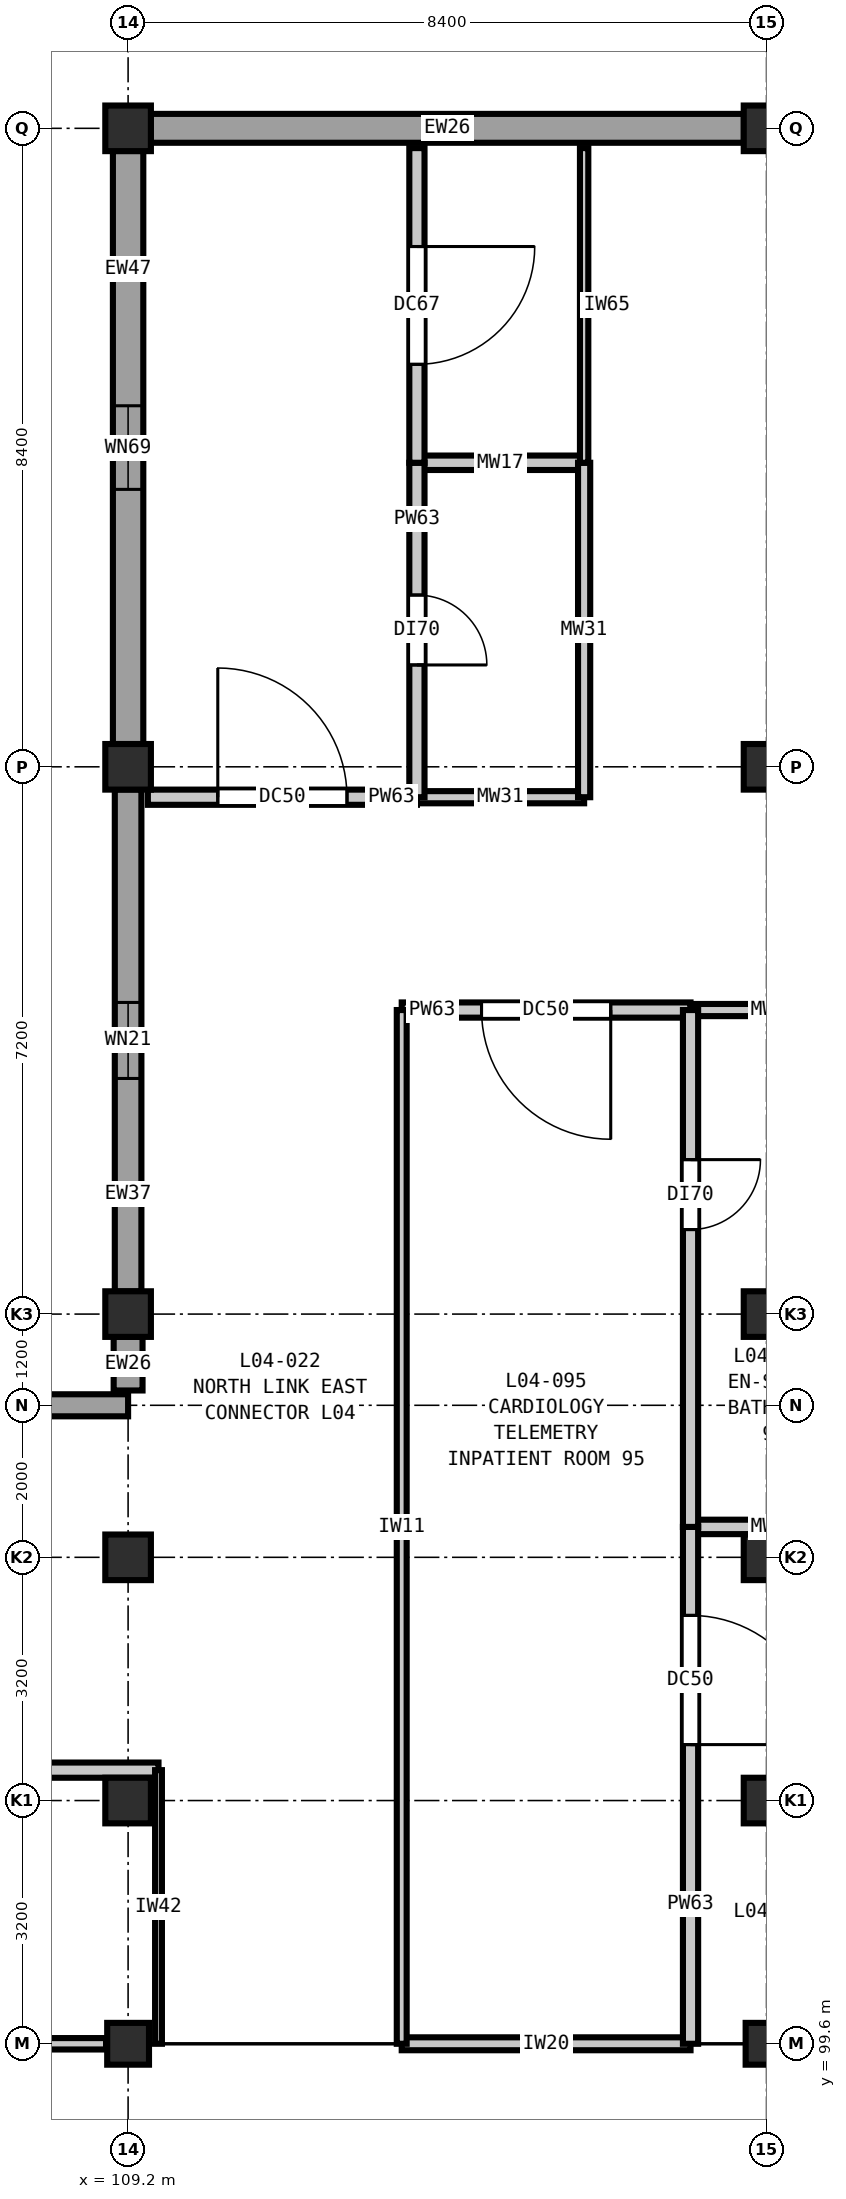
"""IFC4 building model, lengths in metres.
Left out: names, types, materials, properties, quantities, classifications, styles, units other than length and angle.
Written with IfcOpenShell. Run it as: python <this file> out.ifc"""

import sys

from ifc_helpers import new_model, si_unit, direction, frame, frame_2d, origin, origin_2d, place, context, subcontext, project, spatial, rectangle, extrude, element, fill, save


model = new_model("IFC4")
c1 = context("Model", 3, precision=1e-05, world=origin(), true_north=direction((0.0, 1.0)))
c2 = subcontext(c1, "Body", "Model", "MODEL_VIEW")
j1 = project(units=[si_unit("LENGTHUNIT", "METRE"), si_unit("PLANEANGLEUNIT", "RADIAN")], contexts=[c1])
p1 = place(None, origin())
s1 = spatial("IfcSite", under=j1, at=p1, CompositionType="ELEMENT")
p2 = place(p1, origin())
s2 = spatial("IfcBuilding", under=s1, at=p2, CompositionType="ELEMENT")
p3 = place(p2, frame((0.0, 0.0, 20.4)))
s3 = spatial("IfcBuildingStorey", under=s2, at=p3, CompositionType="ELEMENT", Elevation=20.4)
p4 = place(p3, frame((109.2, 99.6, 0.0), z_axis=(0.0, 0.0, 1.0), x_axis=(1.0, 0.0, 0.0)))
e1 = element("IfcColumn", 1, at=p4, inside=s3, PredefinedType="COLUMN", context=c2, shape_type="SweptSolid", body=[
    extrude(rectangle(XDim=0.55, YDim=0.55, at=origin_2d()), origin(), (0.0, 0.0, 1.0), 4.2),
])
for number, where, z_axis, x_axis in (
    (2, (109.2, 102.8, 0.0), (0.0, 0.0, 1.0), (1.0, 0.0, 0.0)),
    (3, (109.2, 106.0, 0.0), (0.0, 0.0, 1.0), (1.0, 0.0, 0.0)),
    (4, (109.2, 109.2, 0.0), (0.0, 0.0, 1.0), (1.0, 0.0, 0.0)),
    (5, (109.2, 116.4, 0.0), (0.0, 0.0, 1.0), (1.0, 0.0, 0.0)),
    (6, (109.2, 124.8, 0.0), (0.0, 0.0, 1.0), (1.0, 0.0, 0.0)),
):
    element("IfcColumn", number, at=place(p3, frame(where, z_axis=z_axis, x_axis=x_axis)), inside=s3, PredefinedType="COLUMN", context=c2, shape_type="SweptSolid", body=[
        extrude(rectangle(XDim=0.6, YDim=0.6, at=origin_2d()), origin(), (0.0, 0.0, 1.0), 4.2),
    ])
p5 = place(p3, frame((117.6, 99.6, 0.0), z_axis=(0.0, 0.0, 1.0), x_axis=(1.0, 0.0, 0.0)))
e7 = element("IfcColumn", 7, at=p5, inside=s3, PredefinedType="COLUMN", context=c2, shape_type="SweptSolid", body=[
    extrude(rectangle(XDim=0.55, YDim=0.55, at=origin_2d()), origin(), (0.0, 0.0, 1.0), 4.2),
])
for number, where, z_axis, x_axis in (
    (8, (117.6, 102.8, 0.0), (0.0, 0.0, 1.0), (1.0, 0.0, 0.0)),
    (9, (117.6, 106.0, 0.0), (0.0, 0.0, 1.0), (1.0, 0.0, 0.0)),
    (10, (117.6, 109.2, 0.0), (0.0, 0.0, 1.0), (1.0, 0.0, 0.0)),
    (11, (117.6, 116.4, 0.0), (0.0, 0.0, 1.0), (1.0, 0.0, 0.0)),
    (12, (117.6, 124.8, 0.0), (0.0, 0.0, 1.0), (1.0, 0.0, 0.0)),
):
    element("IfcColumn", number, at=place(p3, frame(where, z_axis=z_axis, x_axis=x_axis)), inside=s3, PredefinedType="COLUMN", context=c2, shape_type="SweptSolid", body=[
        extrude(rectangle(XDim=0.6, YDim=0.6, at=origin_2d()), origin(), (0.0, 0.0, 1.0), 4.2),
    ])
p6 = place(p3, frame((101.098, 108.0, 0.0), z_axis=(0.0, 0.0, 1.0), x_axis=(1.0, 0.0, 0.0)))
e13 = element("IfcWall", 13, at=p6, inside=s3, PredefinedType="SOLIDWALL", context=c2, shape_type="SweptSolid", body=[
    extrude(rectangle(XDim=8.102, YDim=0.29, at=frame_2d((4.051, 0.0))), origin(), (0.0, 0.0, 1.0), 3.48),
])
p7 = place(p6, frame((3.601, 0.0, 0.9)))
e14 = element("IfcOpeningElement", 14, at=p7, cuts=e13, PredefinedType="OPENING", context=c2, shape_type="SweptSolid", body=[
    extrude(rectangle(XDim=0.9, YDim=1.55, at=frame_2d((0.45, 0.775))), frame((0.0, 0.155, 0.0), z_axis=(0.0, -1.0, 0.0), x_axis=(1.0, 0.0, 0.0)), (0.0, 0.0, 1.0), 0.31),
])
p8 = place(p3, frame((109.2, 108.195, 0.0), z_axis=(0.0, 0.0, 1.0), x_axis=(0.0, 1.0, 0.0)))
e15 = element("IfcWall", 15, at=p8, inside=s3, PredefinedType="SOLIDWALL", context=c2, shape_type="SweptSolid", body=[
    extrude(rectangle(XDim=0.707, YDim=0.38, at=frame_2d((0.354, 0.0))), origin(), (0.0, 0.0, 1.0), 3.48),
])
p9 = place(p3, frame((109.2, 109.498, 0.0), z_axis=(0.0, 0.0, 1.0), x_axis=(0.0, 1.0, 0.0)))
e16 = element("IfcWall", 16, at=p9, inside=s3, PredefinedType="SOLIDWALL", context=c2, shape_type="SweptSolid", body=[
    extrude(rectangle(XDim=6.604, YDim=0.35, at=frame_2d((3.302, 0.0))), origin(), (0.0, 0.0, 1.0), 3.48),
])
p10 = place(p9, frame((2.802, 0.0, 0.9)))
e17 = element("IfcOpeningElement", 17, at=p10, cuts=e16, PredefinedType="OPENING", context=c2, shape_type="SweptSolid", body=[
    extrude(rectangle(XDim=1.0, YDim=1.55, at=frame_2d((0.5, 0.775))), frame((0.0, 0.185, 0.0), z_axis=(0.0, -1.0, 0.0), x_axis=(1.0, 0.0, 0.0)), (0.0, 0.0, 1.0), 0.37),
])
p11 = place(p3, frame((109.2, 116.698, 0.0), z_axis=(0.0, 0.0, 1.0), x_axis=(0.0, 1.0, 0.0)))
e18 = element("IfcWall", 18, at=p11, inside=s3, PredefinedType="SOLIDWALL", context=c2, shape_type="SweptSolid", body=[
    extrude(rectangle(XDim=7.804, YDim=0.4, at=frame_2d((3.902, 0.0))), origin(), (0.0, 0.0, 1.0), 3.48),
])
p12 = place(p11, frame((3.352, 0.0, 0.9)))
e19 = element("IfcOpeningElement", 19, at=p12, cuts=e18, PredefinedType="OPENING", context=c2, shape_type="SweptSolid", body=[
    extrude(rectangle(XDim=1.1, YDim=1.55, at=frame_2d((0.55, 0.775))), frame((0.0, 0.21, 0.0), z_axis=(0.0, -1.0, 0.0), x_axis=(1.0, 0.0, 0.0)), (0.0, 0.0, 1.0), 0.42),
])
p13 = place(p3, frame((109.498, 124.8, 0.0), z_axis=(0.0, 0.0, 1.0), x_axis=(1.0, 0.0, 0.0)))
e20 = element("IfcWall", 20, at=p13, inside=s3, PredefinedType="SOLIDWALL", context=c2, shape_type="SweptSolid", body=[
    extrude(rectangle(XDim=7.804, YDim=0.38, at=frame_2d((3.902, 0.0))), origin(), (0.0, 0.0, 1.0), 3.48),
])
p14 = place(p3, frame((102.8, 99.6, 0.0), z_axis=(0.0, 0.0, 1.0), x_axis=(1.0, 0.0, 0.0)))
e21 = element("IfcWall", 21, at=p14, inside=s3, PredefinedType="PARTITIONING", context=c2, shape_type="SweptSolid", body=[
    extrude(rectangle(XDim=6.11, YDim=0.15, at=frame_2d((3.055, 0.0))), origin(), (0.0, 0.0, 1.0), 3.585),
])
p15 = place(p3, frame((112.8, 99.6, 0.0), z_axis=(0.0, 0.0, 1.0), x_axis=(1.0, 0.0, 0.0)))
e22 = element("IfcWall", 22, at=p15, inside=s3, PredefinedType="PARTITIONING", context=c2, shape_type="SweptSolid", body=[
    extrude(rectangle(XDim=3.8, YDim=0.17, at=frame_2d((1.9, 0.0))), origin(), (0.0, 0.0, 1.0), 3.585),
])
p16 = place(p3, frame((102.8, 103.2, 0.0), z_axis=(0.0, 0.0, 1.0), x_axis=(1.0, 0.0, 0.0)))
e23 = element("IfcWall", 23, at=p16, inside=s3, PredefinedType="PARTITIONING", context=c2, shape_type="SweptSolid", body=[
    extrude(rectangle(XDim=6.8, YDim=0.2, at=frame_2d((3.4, 0.0))), origin(), (0.0, 0.0, 1.0), 3.82),
])
p17 = place(p16, frame((2.75, 0.0, 0.0)))
e24 = element("IfcOpeningElement", 24, at=p17, cuts=e23, PredefinedType="OPENING", context=c2, shape_type="SweptSolid", body=[
    extrude(rectangle(XDim=1.3, YDim=2.2, at=frame_2d((0.65, 1.1))), frame((0.0, 0.11, 0.0), z_axis=(0.0, -1.0, 0.0), x_axis=(1.0, 0.0, 0.0)), (0.0, 0.0, 1.0), 0.22),
])
p18 = place(p3, frame((116.6, 106.4, 0.0), z_axis=(0.0, 0.0, 1.0), x_axis=(1.0, 0.0, 0.0)))
e25 = element("IfcWall", 25, at=p18, inside=s3, PredefinedType="PLUMBINGWALL", context=c2, shape_type="SweptSolid", body=[
    extrude(rectangle(XDim=2.2, YDim=0.19, at=frame_2d((1.1, 0.0))), origin(), (0.0, 0.0, 1.0), 3.82),
])
p19 = place(p3, frame((112.8, 113.2, 0.0), z_axis=(0.0, 0.0, 1.0), x_axis=(1.0, 0.0, 0.0)))
e26 = element("IfcWall", 26, at=p19, inside=s3, PredefinedType="PARTITIONING", context=c2, shape_type="SweptSolid", body=[
    extrude(rectangle(XDim=3.8, YDim=0.2, at=frame_2d((1.9, 0.0))), origin(), (0.0, 0.0, 1.0), 3.82),
])
p20 = place(p19, frame((1.05, 0.0, 0.0)))
e27 = element("IfcOpeningElement", 27, at=p20, cuts=e26, PredefinedType="OPENING", context=c2, shape_type="SweptSolid", body=[
    extrude(rectangle(XDim=1.7, YDim=2.3, at=frame_2d((0.85, 1.15))), frame((0.0, 0.11, 0.0), z_axis=(0.0, -1.0, 0.0), x_axis=(1.0, 0.0, 0.0)), (0.0, 0.0, 1.0), 0.22),
])
p21 = place(p3, frame((116.6, 113.2, 0.0), z_axis=(0.0, 0.0, 1.0), x_axis=(1.0, 0.0, 0.0)))
e28 = element("IfcWall", 28, at=p21, inside=s3, PredefinedType="PLUMBINGWALL", context=c2, shape_type="SweptSolid", body=[
    extrude(rectangle(XDim=2.2, YDim=0.16, at=frame_2d((1.1, 0.0))), origin(), (0.0, 0.0, 1.0), 3.82),
])
p22 = place(p3, frame((109.46, 116.0, 0.0), z_axis=(0.0, 0.0, 1.0), x_axis=(1.0, 0.0, 0.0)))
e29 = element("IfcWall", 29, at=p22, inside=s3, PredefinedType="PARTITIONING", context=c2, shape_type="SweptSolid", body=[
    extrude(rectangle(XDim=3.54, YDim=0.2, at=frame_2d((1.77, 0.0))), origin(), (0.0, 0.0, 1.0), 3.82),
])
p23 = place(p22, frame((0.92, 0.0, 0.0)))
e30 = element("IfcOpeningElement", 30, at=p23, cuts=e29, PredefinedType="OPENING", context=c2, shape_type="SweptSolid", body=[
    extrude(rectangle(XDim=1.7, YDim=2.3, at=frame_2d((0.85, 1.15))), frame((0.0, 0.11, 0.0), z_axis=(0.0, -1.0, 0.0), x_axis=(1.0, 0.0, 0.0)), (0.0, 0.0, 1.0), 0.22),
])
p24 = place(p3, frame((113.0, 116.0, 0.0), z_axis=(0.0, 0.0, 1.0), x_axis=(1.0, 0.0, 0.0)))
e31 = element("IfcWall", 31, at=p24, inside=s3, PredefinedType="PLUMBINGWALL", context=c2, shape_type="SweptSolid", body=[
    extrude(rectangle(XDim=2.2, YDim=0.16, at=frame_2d((1.1, 0.0))), origin(), (0.0, 0.0, 1.0), 3.82),
])
p25 = place(p3, frame((113.0, 120.4, 0.0), z_axis=(0.0, 0.0, 1.0), x_axis=(1.0, 0.0, 0.0)))
e32 = element("IfcWall", 32, at=p25, inside=s3, PredefinedType="PLUMBINGWALL", context=c2, shape_type="SweptSolid", body=[
    extrude(rectangle(XDim=2.2, YDim=0.19, at=frame_2d((1.1, 0.0))), origin(), (0.0, 0.0, 1.0), 3.82),
])
p26 = place(p3, frame((109.6, 99.6, 0.0), z_axis=(0.0, 0.0, 1.0), x_axis=(0.0, 1.0, 0.0)))
e33 = element("IfcWall", 33, at=p26, inside=s3, PredefinedType="PARTITIONING", context=c2, shape_type="SweptSolid", body=[
    extrude(rectangle(XDim=3.6, YDim=0.09, at=frame_2d((1.8, 0.0))), origin(), (0.0, 0.0, 1.0), 3.82),
])
p27 = place(p3, frame((112.8, 99.6, 0.0), z_axis=(0.0, 0.0, 1.0), x_axis=(0.0, 1.0, 0.0)))
e34 = element("IfcWall", 34, at=p27, inside=s3, PredefinedType="PARTITIONING", context=c2, shape_type="SweptSolid", body=[
    extrude(rectangle(XDim=13.6, YDim=0.13, at=frame_2d((6.8, 0.0))), origin(), (0.0, 0.0, 1.0), 3.82),
])
p28 = place(p3, frame((113.0, 116.0, 0.0), z_axis=(0.0, 0.0, 1.0), x_axis=(0.0, 1.0, 0.0)))
e35 = element("IfcWall", 35, at=p28, inside=s3, PredefinedType="PARTITIONING", context=c2, shape_type="SweptSolid", body=[
    extrude(rectangle(XDim=4.4, YDim=0.2, at=frame_2d((2.2, 0.0))), origin(), (0.0, 0.0, 1.0), 3.82),
])
p29 = place(p28, frame((1.74, 0.0, 0.0)))
e36 = element("IfcOpeningElement", 36, at=p29, cuts=e35, PredefinedType="OPENING", context=c2, shape_type="SweptSolid", body=[
    extrude(rectangle(XDim=0.92, YDim=2.1, at=frame_2d((0.46, 1.05))), frame((0.0, 0.11, 0.0), z_axis=(0.0, -1.0, 0.0), x_axis=(1.0, 0.0, 0.0)), (0.0, 0.0, 1.0), 0.22),
])
p30 = place(p3, frame((113.0, 120.4, 0.0), z_axis=(0.0, 0.0, 1.0), x_axis=(0.0, 1.0, 0.0)))
e37 = element("IfcWall", 37, at=p30, inside=s3, PredefinedType="PARTITIONING", context=c2, shape_type="SweptSolid", body=[
    extrude(rectangle(XDim=4.14, YDim=0.2, at=frame_2d((2.07, 0.0))), origin(), (0.0, 0.0, 1.0), 3.82),
])
p31 = place(p30, frame((1.295, 0.0, 0.0)))
e38 = element("IfcOpeningElement", 38, at=p31, cuts=e37, PredefinedType="OPENING", context=c2, shape_type="SweptSolid", body=[
    extrude(rectangle(XDim=1.55, YDim=2.25, at=frame_2d((0.775, 1.125))), frame((0.0, 0.11, 0.0), z_axis=(0.0, -1.0, 0.0), x_axis=(1.0, 0.0, 0.0)), (0.0, 0.0, 1.0), 0.22),
])
p32 = place(p3, frame((115.2, 116.0, 0.0), z_axis=(0.0, 0.0, 1.0), x_axis=(0.0, 1.0, 0.0)))
e39 = element("IfcWall", 39, at=p32, inside=s3, PredefinedType="PLUMBINGWALL", context=c2, shape_type="SweptSolid", body=[
    extrude(rectangle(XDim=4.4, YDim=0.16, at=frame_2d((2.2, 0.0))), origin(), (0.0, 0.0, 1.0), 3.82),
])
p33 = place(p3, frame((115.2, 120.4, 0.0), z_axis=(0.0, 0.0, 1.0), x_axis=(0.0, 1.0, 0.0)))
e40 = element("IfcWall", 40, at=p33, inside=s3, PredefinedType="PARTITIONING", context=c2, shape_type="SweptSolid", body=[
    extrude(rectangle(XDim=4.14, YDim=0.11, at=frame_2d((2.07, 0.0))), origin(), (0.0, 0.0, 1.0), 3.82),
])
p34 = place(p3, frame((116.6, 99.6, 0.0), z_axis=(0.0, 0.0, 1.0), x_axis=(0.0, 1.0, 0.0)))
e41 = element("IfcWall", 41, at=p34, inside=s3, PredefinedType="PARTITIONING", context=c2, shape_type="SweptSolid", body=[
    extrude(rectangle(XDim=6.8, YDim=0.2, at=frame_2d((3.4, 0.0))), origin(), (0.0, 0.0, 1.0), 3.82),
])
p35 = place(p34, frame((3.936, 0.0, 0.0)))
e42 = element("IfcOpeningElement", 42, at=p35, cuts=e41, PredefinedType="OPENING", context=c2, shape_type="SweptSolid", body=[
    extrude(rectangle(XDim=1.7, YDim=2.3, at=frame_2d((0.85, 1.15))), frame((0.0, 0.11, 0.0), z_axis=(0.0, -1.0, 0.0), x_axis=(1.0, 0.0, 0.0)), (0.0, 0.0, 1.0), 0.22),
])
p36 = place(p3, frame((116.6, 106.4, 0.0), z_axis=(0.0, 0.0, 1.0), x_axis=(0.0, 1.0, 0.0)))
e43 = element("IfcWall", 43, at=p36, inside=s3, PredefinedType="PARTITIONING", context=c2, shape_type="SweptSolid", body=[
    extrude(rectangle(XDim=6.8, YDim=0.2, at=frame_2d((3.4, 0.0))), origin(), (0.0, 0.0, 1.0), 3.82),
])
p37 = place(p36, frame((3.912, 0.0, 0.0)))
e44 = element("IfcOpeningElement", 44, at=p37, cuts=e43, PredefinedType="OPENING", context=c2, shape_type="SweptSolid", body=[
    extrude(rectangle(XDim=0.92, YDim=2.1, at=frame_2d((0.46, 1.05))), frame((0.0, 0.11, 0.0), z_axis=(0.0, -1.0, 0.0), x_axis=(1.0, 0.0, 0.0)), (0.0, 0.0, 1.0), 0.22),
])
p38 = place(p10, origin())
e45 = element("IfcWindow", 45, at=p38, inside=s3, PartitioningType="SINGLE_PANEL", PredefinedType="WINDOW", context=c2, shape_type="SweptSolid", body=[
    extrude(rectangle(XDim=1.0, YDim=1.55, at=frame_2d((0.5, 0.775))), frame((0.0, 0.03, 0.0), z_axis=(0.0, -1.0, 0.0), x_axis=(1.0, 0.0, 0.0)), (0.0, 0.0, 1.0), 0.06),
])
fill(e17, e45)
p39 = place(p12, origin())
e46 = element("IfcWindow", 46, at=p39, inside=s3, PartitioningType="SINGLE_PANEL", PredefinedType="WINDOW", context=c2, shape_type="SweptSolid", body=[
    extrude(rectangle(XDim=1.1, YDim=1.55, at=frame_2d((0.55, 0.775))), frame((0.0, 0.03, 0.0), z_axis=(0.0, -1.0, 0.0), x_axis=(1.0, 0.0, 0.0)), (0.0, 0.0, 1.0), 0.06),
])
fill(e19, e46)
p40 = place(p20, frame((1.7, 0.0, 0.0), z_axis=(0.0, 0.0, 1.0), x_axis=(-1.0, 0.0, 0.0)))
e47 = element("IfcDoor", 47, at=p40, inside=s3, OperationType="SINGLE_SWING_LEFT", PredefinedType="DOOR", context=c2, shape_type="SweptSolid", body=[
    extrude(rectangle(XDim=1.7, YDim=2.3, at=frame_2d((0.85, 1.15))), frame((0.0, 0.025, 0.0), z_axis=(0.0, -1.0, 0.0), x_axis=(1.0, 0.0, 0.0)), (0.0, 0.0, 1.0), 0.05),
])
fill(e27, e47)
p41 = place(p23, origin())
e48 = element("IfcDoor", 48, at=p41, inside=s3, OperationType="SINGLE_SWING_LEFT", PredefinedType="DOOR", context=c2, shape_type="SweptSolid", body=[
    extrude(rectangle(XDim=1.7, YDim=2.3, at=frame_2d((0.85, 1.15))), frame((0.0, 0.025, 0.0), z_axis=(0.0, -1.0, 0.0), x_axis=(1.0, 0.0, 0.0)), (0.0, 0.0, 1.0), 0.05),
])
fill(e30, e48)
p42 = place(p29, frame((0.92, 0.0, 0.0), z_axis=(0.0, 0.0, 1.0), x_axis=(-1.0, 0.0, 0.0)))
e49 = element("IfcDoor", 49, at=p42, inside=s3, OperationType="SINGLE_SWING_RIGHT", PredefinedType="DOOR", context=c2, shape_type="SweptSolid", body=[
    extrude(rectangle(XDim=0.92, YDim=2.1, at=frame_2d((0.46, 1.05))), frame((0.0, 0.025, 0.0), z_axis=(0.0, -1.0, 0.0), x_axis=(1.0, 0.0, 0.0)), (0.0, 0.0, 1.0), 0.05),
])
fill(e36, e49)
p43 = place(p31, frame((1.55, 0.0, 0.0), z_axis=(0.0, 0.0, 1.0), x_axis=(-1.0, 0.0, 0.0)))
e50 = element("IfcDoor", 50, at=p43, inside=s3, OperationType="SINGLE_SWING_LEFT", PredefinedType="DOOR", context=c2, shape_type="SweptSolid", body=[
    extrude(rectangle(XDim=1.55, YDim=2.25, at=frame_2d((0.775, 1.125))), frame((0.0, 0.025, 0.0), z_axis=(0.0, -1.0, 0.0), x_axis=(1.0, 0.0, 0.0)), (0.0, 0.0, 1.0), 0.05),
])
fill(e38, e50)
p44 = place(p35, frame((1.7, 0.0, 0.0), z_axis=(0.0, 0.0, 1.0), x_axis=(-1.0, 0.0, 0.0)))
e51 = element("IfcDoor", 51, at=p44, inside=s3, OperationType="SINGLE_SWING_RIGHT", PredefinedType="DOOR", context=c2, shape_type="SweptSolid", body=[
    extrude(rectangle(XDim=1.7, YDim=2.3, at=frame_2d((0.85, 1.15))), frame((0.0, 0.025, 0.0), z_axis=(0.0, -1.0, 0.0), x_axis=(1.0, 0.0, 0.0)), (0.0, 0.0, 1.0), 0.05),
])
fill(e42, e51)
p45 = place(p37, frame((0.92, 0.0, 0.0), z_axis=(0.0, 0.0, 1.0), x_axis=(-1.0, 0.0, 0.0)))
e52 = element("IfcDoor", 52, at=p45, inside=s3, OperationType="SINGLE_SWING_LEFT", PredefinedType="DOOR", context=c2, shape_type="SweptSolid", body=[
    extrude(rectangle(XDim=0.92, YDim=2.1, at=frame_2d((0.46, 1.05))), frame((0.0, 0.025, 0.0), z_axis=(0.0, -1.0, 0.0), x_axis=(1.0, 0.0, 0.0)), (0.0, 0.0, 1.0), 0.05),
])
fill(e44, e52)
save(model, sys.argv[1])
